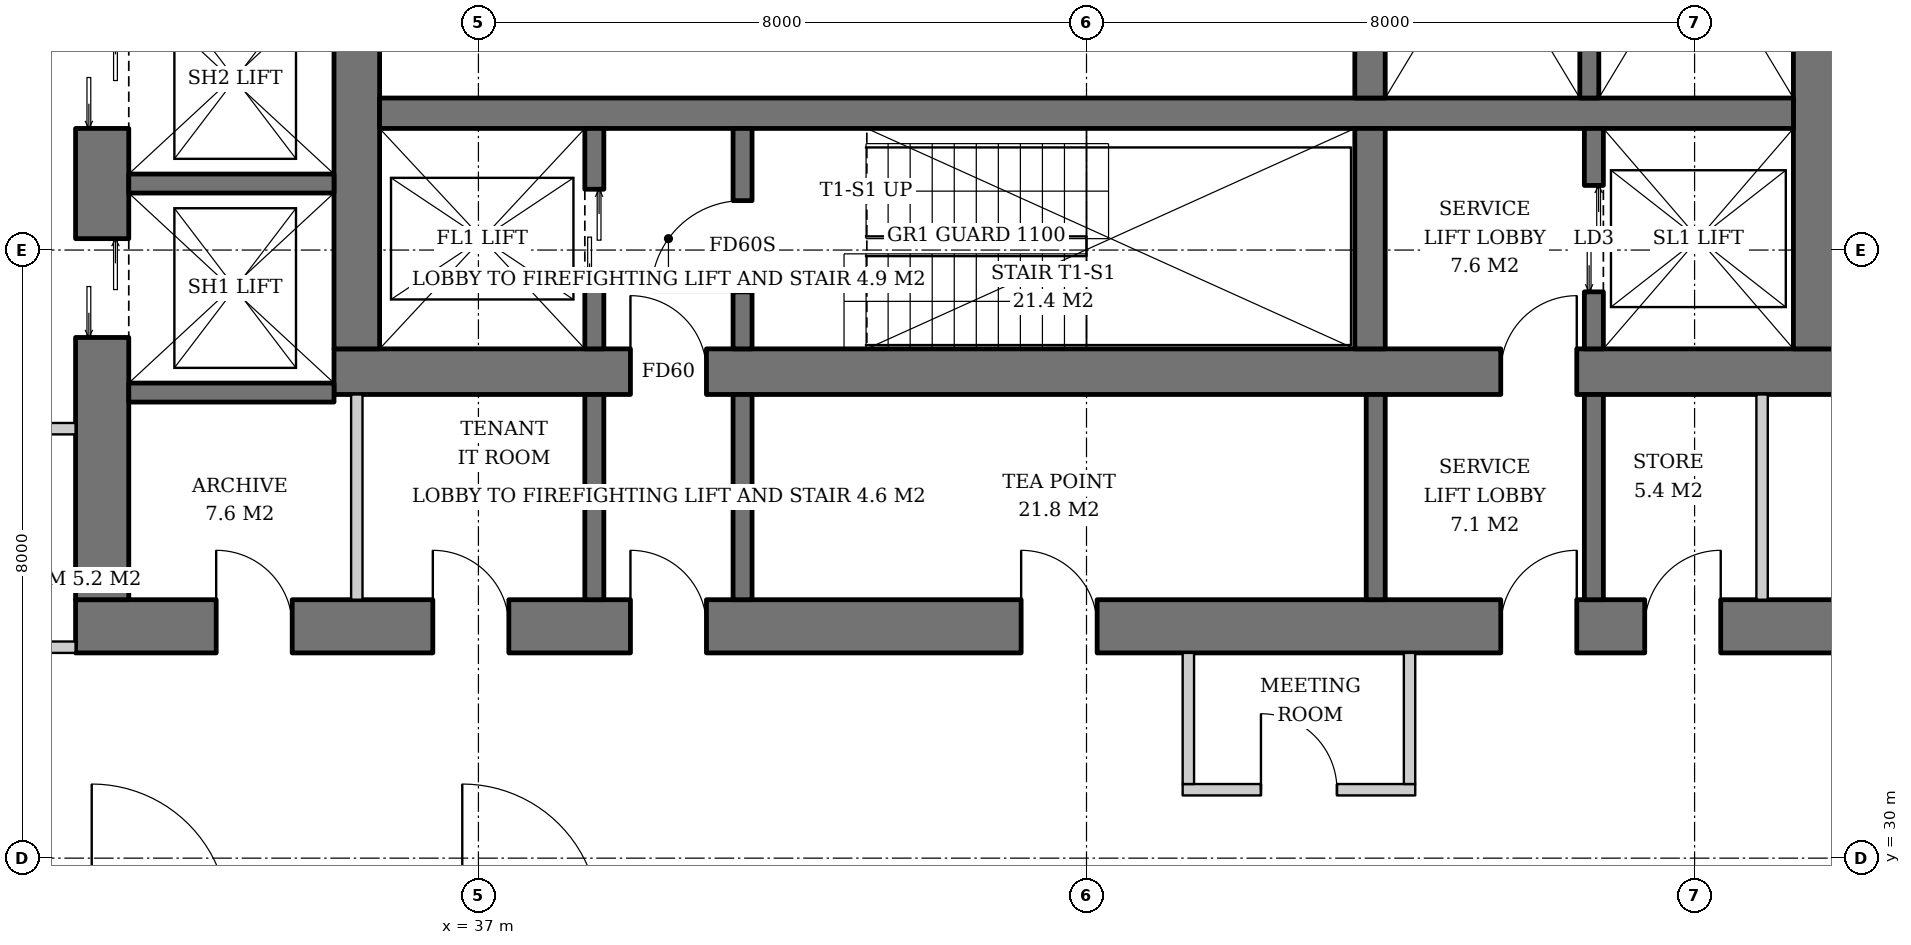
"""IFC4 building model, lengths in metres.
Left out: names, types, materials, properties, quantities, classifications, styles, units other than length and angle.
Written with IfcOpenShell. Run it as: python <this file> out.ifc"""

import sys

from ifc_helpers import new_model, si_unit, direction, frame, frame_2d, origin, place, context, subcontext, project, spatial, rectangle, extrude, element, fill, save


model = new_model("IFC4")
c1 = context("Model", 3, precision=1e-05, world=origin(), true_north=direction((0.0, 1.0)))
c2 = subcontext(c1, "Body", "Model", "MODEL_VIEW")
j1 = project(units=[si_unit("LENGTHUNIT", "METRE"), si_unit("PLANEANGLEUNIT", "RADIAN")], contexts=[c1])
p1 = place(None, origin())
s1 = spatial("IfcSite", under=j1, at=p1, CompositionType="ELEMENT")
p2 = place(p1, origin())
s2 = spatial("IfcBuilding", under=s1, at=p2, CompositionType="ELEMENT")
p3 = place(p2, frame((0.0, 0.0, 93.2)))
s3 = spatial("IfcBuildingStorey", under=s2, at=p3, CompositionType="ELEMENT", Elevation=93.2)
p4 = place(p3, frame((35.1, 36.4, 0.0), z_axis=(0.0, 0.0, 1.0), x_axis=(1.0, 0.0, 0.0)))
e1 = element("IfcWall", 1, at=p4, inside=s3, PredefinedType="SHEAR", context=c2, shape_type="SweptSolid", body=[
    extrude(rectangle(XDim=19.8, YDim=0.6, at=frame_2d((9.9, 0.0))), origin(), (0.0, 0.0, 1.0), 3.8),
])
p5 = place(p4, frame((3.9, 0.0, 0.0)))
e2 = element("IfcOpeningElement", 2, at=p5, cuts=e1, PredefinedType="OPENING", context=c2, shape_type="SweptSolid", body=[
    extrude(rectangle(XDim=1.0, YDim=2.1, at=frame_2d((0.5, 1.05))), frame((0.0, 0.31, 0.0), z_axis=(0.0, -1.0, 0.0), x_axis=(1.0, 0.0, 0.0)), (0.0, 0.0, 1.0), 0.62),
])
p6 = place(p4, frame((15.35, 0.0, 0.0)))
e3 = element("IfcOpeningElement", 3, at=p6, cuts=e1, PredefinedType="OPENING", context=c2, shape_type="SweptSolid", body=[
    extrude(rectangle(XDim=1.0, YDim=2.1, at=frame_2d((0.5, 1.05))), frame((0.0, 0.31, 0.0), z_axis=(0.0, -1.0, 0.0), x_axis=(1.0, 0.0, 0.0)), (0.0, 0.0, 1.0), 0.62),
])
p7 = place(p3, frame((35.4, 36.7, 0.0), z_axis=(0.0, 0.0, 1.0), x_axis=(0.0, 1.0, 0.0)))
e4 = element("IfcWall", 4, at=p7, inside=s3, PredefinedType="SHEAR", context=c2, shape_type="SweptSolid", body=[
    extrude(rectangle(XDim=18.6, YDim=0.6, at=frame_2d((9.3, 0.0))), origin(), (0.0, 0.0, 1.0), 3.8),
])
p8 = place(p7, frame((8.4, 0.0, 0.0)))
e5 = element("IfcOpeningElement", 5, at=p8, cuts=e4, PredefinedType="OPENING", context=c2, shape_type="SweptSolid", body=[
    extrude(rectangle(XDim=1.8, YDim=2.4, at=frame_2d((0.9, 1.2))), frame((0.0, 0.31, 0.0), z_axis=(0.0, -1.0, 0.0), x_axis=(1.0, 0.0, 0.0)), (0.0, 0.0, 1.0), 0.62),
])
p9 = place(p3, frame((54.6, 36.7, 0.0), z_axis=(0.0, 0.0, 1.0), x_axis=(0.0, 1.0, 0.0)))
e6 = element("IfcWall", 6, at=p9, inside=s3, PredefinedType="SHEAR", context=c2, shape_type="SweptSolid", body=[
    extrude(rectangle(XDim=18.6, YDim=0.6, at=frame_2d((9.3, 0.0))), origin(), (0.0, 0.0, 1.0), 3.8),
])
p10 = place(p9, frame((8.4, 0.0, 0.0)))
e7 = element("IfcOpeningElement", 7, at=p10, cuts=e6, PredefinedType="OPENING", context=c2, shape_type="SweptSolid", body=[
    extrude(rectangle(XDim=1.8, YDim=2.4, at=frame_2d((0.9, 1.2))), frame((0.0, 0.31, 0.0), z_axis=(0.0, -1.0, 0.0), x_axis=(1.0, 0.0, 0.0)), (0.0, 0.0, 1.0), 0.62),
])
p11 = place(p3, frame((31.7, 33.05, 0.0), z_axis=(0.0, 0.0, 1.0), x_axis=(1.0, 0.0, 0.0)))
e8 = element("IfcWall", 8, at=p11, inside=s3, PredefinedType="SHEAR", context=c2, shape_type="SweptSolid", body=[
    extrude(rectangle(XDim=26.6, YDim=0.7, at=frame_2d((13.3, 0.0))), origin(), (0.0, 0.0, 1.0), 3.8),
])
p12 = place(p11, frame((7.3, 0.0, 0.0)))
e9 = element("IfcOpeningElement", 9, at=p12, cuts=e8, PredefinedType="OPENING", context=c2, shape_type="SweptSolid", body=[
    extrude(rectangle(XDim=1.0, YDim=2.1, at=frame_2d((0.5, 1.05))), frame((0.0, 0.36, 0.0), z_axis=(0.0, -1.0, 0.0), x_axis=(1.0, 0.0, 0.0)), (0.0, 0.0, 1.0), 0.72),
])
p13 = place(p11, frame((18.75, 0.0, 0.0)))
e10 = element("IfcOpeningElement", 10, at=p13, cuts=e8, PredefinedType="OPENING", context=c2, shape_type="SweptSolid", body=[
    extrude(rectangle(XDim=1.0, YDim=2.1, at=frame_2d((0.5, 1.05))), frame((0.0, 0.36, 0.0), z_axis=(0.0, -1.0, 0.0), x_axis=(1.0, 0.0, 0.0)), (0.0, 0.0, 1.0), 0.72),
])
p14 = place(p11, frame((1.85, 0.0, 0.0)))
e11 = element("IfcOpeningElement", 11, at=p14, cuts=e8, PredefinedType="OPENING", context=c2, shape_type="SweptSolid", body=[
    extrude(rectangle(XDim=1.0, YDim=2.1, at=frame_2d((0.5, 1.05))), frame((0.0, 0.36, 0.0), z_axis=(0.0, -1.0, 0.0), x_axis=(1.0, 0.0, 0.0)), (0.0, 0.0, 1.0), 0.72),
])
p15 = place(p11, frame((4.7, 0.0, 0.0)))
e12 = element("IfcOpeningElement", 12, at=p15, cuts=e8, PredefinedType="OPENING", context=c2, shape_type="SweptSolid", body=[
    extrude(rectangle(XDim=1.0, YDim=2.1, at=frame_2d((0.5, 1.05))), frame((0.0, 0.36, 0.0), z_axis=(0.0, -1.0, 0.0), x_axis=(1.0, 0.0, 0.0)), (0.0, 0.0, 1.0), 0.72),
])
p16 = place(p11, frame((12.44, 0.0, 0.0)))
e13 = element("IfcOpeningElement", 13, at=p16, cuts=e8, PredefinedType="OPENING", context=c2, shape_type="SweptSolid", body=[
    extrude(rectangle(XDim=1.0, YDim=2.1, at=frame_2d((0.5, 1.05))), frame((0.0, 0.36, 0.0), z_axis=(0.0, -1.0, 0.0), x_axis=(1.0, 0.0, 0.0)), (0.0, 0.0, 1.0), 0.72),
])
p17 = place(p11, frame((20.644, 0.0, 0.0)))
e14 = element("IfcOpeningElement", 14, at=p17, cuts=e8, PredefinedType="OPENING", context=c2, shape_type="SweptSolid", body=[
    extrude(rectangle(XDim=1.0, YDim=2.1, at=frame_2d((0.5, 1.05))), frame((0.0, 0.36, 0.0), z_axis=(0.0, -1.0, 0.0), x_axis=(1.0, 0.0, 0.0)), (0.0, 0.0, 1.0), 0.72),
])
p18 = place(p11, frame((23.544, 0.0, 0.0)))
e15 = element("IfcOpeningElement", 15, at=p18, cuts=e8, PredefinedType="OPENING", context=c2, shape_type="SweptSolid", body=[
    extrude(rectangle(XDim=1.0, YDim=2.1, at=frame_2d((0.5, 1.05))), frame((0.0, 0.36, 0.0), z_axis=(0.0, -1.0, 0.0), x_axis=(1.0, 0.0, 0.0)), (0.0, 0.0, 1.0), 0.72),
])
p19 = place(p3, frame((32.05, 33.4, 0.0), z_axis=(0.0, 0.0, 1.0), x_axis=(0.0, 1.0, 0.0)))
e16 = element("IfcWall", 16, at=p19, inside=s3, PredefinedType="SHEAR", context=c2, shape_type="SweptSolid", body=[
    extrude(rectangle(XDim=25.2, YDim=0.7, at=frame_2d((12.6, 0.0))), origin(), (0.0, 0.0, 1.0), 3.8),
])
p20 = place(p19, frame((3.45, 0.0, 0.0)))
e17 = element("IfcOpeningElement", 17, at=p20, cuts=e16, PredefinedType="OPENING", context=c2, shape_type="SweptSolid", body=[
    extrude(rectangle(XDim=1.3, YDim=2.2, at=frame_2d((0.65, 1.1))), frame((0.0, 0.36, 0.0), z_axis=(0.0, -1.0, 0.0), x_axis=(1.0, 0.0, 0.0)), (0.0, 0.0, 1.0), 0.72),
])
p21 = place(p19, frame((6.2, 0.0, 0.0)))
e18 = element("IfcOpeningElement", 18, at=p21, cuts=e16, PredefinedType="OPENING", context=c2, shape_type="SweptSolid", body=[
    extrude(rectangle(XDim=1.3, YDim=2.2, at=frame_2d((0.65, 1.1))), frame((0.0, 0.36, 0.0), z_axis=(0.0, -1.0, 0.0), x_axis=(1.0, 0.0, 0.0)), (0.0, 0.0, 1.0), 0.72),
])
p22 = place(p19, frame((8.95, 0.0, 0.0)))
e19 = element("IfcOpeningElement", 19, at=p22, cuts=e16, PredefinedType="OPENING", context=c2, shape_type="SweptSolid", body=[
    extrude(rectangle(XDim=1.3, YDim=2.2, at=frame_2d((0.65, 1.1))), frame((0.0, 0.36, 0.0), z_axis=(0.0, -1.0, 0.0), x_axis=(1.0, 0.0, 0.0)), (0.0, 0.0, 1.0), 0.72),
])
p23 = place(p19, frame((14.95, 0.0, 0.0)))
e20 = element("IfcOpeningElement", 20, at=p23, cuts=e16, PredefinedType="OPENING", context=c2, shape_type="SweptSolid", body=[
    extrude(rectangle(XDim=1.3, YDim=2.2, at=frame_2d((0.65, 1.1))), frame((0.0, 0.36, 0.0), z_axis=(0.0, -1.0, 0.0), x_axis=(1.0, 0.0, 0.0)), (0.0, 0.0, 1.0), 0.72),
])
p24 = place(p19, frame((17.7, 0.0, 0.0)))
e21 = element("IfcOpeningElement", 21, at=p24, cuts=e16, PredefinedType="OPENING", context=c2, shape_type="SweptSolid", body=[
    extrude(rectangle(XDim=1.3, YDim=2.2, at=frame_2d((0.65, 1.1))), frame((0.0, 0.36, 0.0), z_axis=(0.0, -1.0, 0.0), x_axis=(1.0, 0.0, 0.0)), (0.0, 0.0, 1.0), 0.72),
])
p25 = place(p19, frame((11.7, 0.0, 0.0)))
e22 = element("IfcOpeningElement", 22, at=p25, cuts=e16, PredefinedType="OPENING", context=c2, shape_type="SweptSolid", body=[
    extrude(rectangle(XDim=1.8, YDim=2.4, at=frame_2d((0.9, 1.2))), frame((0.0, 0.36, 0.0), z_axis=(0.0, -1.0, 0.0), x_axis=(1.0, 0.0, 0.0)), (0.0, 0.0, 1.0), 0.72),
])
p26 = place(p3, frame((35.7, 39.8, 0.0), z_axis=(0.0, 0.0, 1.0), x_axis=(1.0, 0.0, 0.0)))
e23 = element("IfcWall", 23, at=p26, inside=s3, PredefinedType="SHEAR", context=c2, shape_type="SweptSolid", body=[
    extrude(rectangle(XDim=18.6, YDim=0.4, at=frame_2d((9.3, 0.0))), origin(), (0.0, 0.0, 1.0), 3.8),
])
p27 = place(p3, frame((48.73, 36.7, 0.0), z_axis=(0.0, 0.0, 1.0), x_axis=(0.0, 1.0, 0.0)))
e24 = element("IfcWall", 24, at=p27, inside=s3, PredefinedType="SHEAR", context=c2, shape_type="SweptSolid", body=[
    extrude(rectangle(XDim=2.9, YDim=0.4, at=frame_2d((1.45, 0.0))), origin(), (0.0, 0.0, 1.0), 3.8),
])
p28 = place(p3, frame((48.73, 40.0, 0.0), z_axis=(0.0, 0.0, 1.0), x_axis=(0.0, 1.0, 0.0)))
e25 = element("IfcWall", 25, at=p28, inside=s3, PredefinedType="SHEAR", context=c2, shape_type="SweptSolid", body=[
    extrude(rectangle(XDim=12.0, YDim=0.4, at=frame_2d((6.0, 0.0))), origin(), (0.0, 0.0, 1.0), 3.8),
])
p29 = place(p3, frame((38.525, 36.7, 0.0), z_axis=(0.0, 0.0, 1.0), x_axis=(0.0, 1.0, 0.0)))
e26 = element("IfcWall", 26, at=p29, inside=s3, PredefinedType="SHEAR", context=c2, shape_type="SweptSolid", body=[
    extrude(rectangle(XDim=2.9, YDim=0.25, at=frame_2d((1.45, 0.0))), origin(), (0.0, 0.0, 1.0), 3.8),
])
p30 = place(p29, frame((0.8, 0.0, 0.0)))
e27 = element("IfcOpeningElement", 27, at=p30, cuts=e26, PredefinedType="OPENING", context=c2, shape_type="SweptSolid", body=[
    extrude(rectangle(XDim=1.3, YDim=2.2, at=frame_2d((0.65, 1.1))), frame((0.0, 0.135, 0.0), z_axis=(0.0, -1.0, 0.0), x_axis=(1.0, 0.0, 0.0)), (0.0, 0.0, 1.0), 0.27),
])
p31 = place(p3, frame((40.475, 36.7, 0.0), z_axis=(0.0, 0.0, 1.0), x_axis=(0.0, 1.0, 0.0)))
e28 = element("IfcWall", 28, at=p31, inside=s3, PredefinedType="SHEAR", context=c2, shape_type="SweptSolid", body=[
    extrude(rectangle(XDim=2.9, YDim=0.25, at=frame_2d((1.45, 0.0))), origin(), (0.0, 0.0, 1.0), 3.8),
])
p32 = place(p31, frame((0.75, 0.0, 0.0)))
e29 = element("IfcOpeningElement", 29, at=p32, cuts=e28, PredefinedType="OPENING", context=c2, shape_type="SweptSolid", body=[
    extrude(rectangle(XDim=1.2, YDim=2.1, at=frame_2d((0.6, 1.05))), frame((0.0, 0.135, 0.0), z_axis=(0.0, -1.0, 0.0), x_axis=(1.0, 0.0, 0.0)), (0.0, 0.0, 1.0), 0.27),
])
p33 = place(p3, frame((51.675, 36.7, 0.0), z_axis=(0.0, 0.0, 1.0), x_axis=(0.0, 1.0, 0.0)))
e30 = element("IfcWall", 30, at=p33, inside=s3, PredefinedType="SHEAR", context=c2, shape_type="SweptSolid", body=[
    extrude(rectangle(XDim=2.9, YDim=0.25, at=frame_2d((1.45, 0.0))), origin(), (0.0, 0.0, 1.0), 3.8),
])
p34 = place(p33, frame((0.75, 0.0, 0.0)))
e31 = element("IfcOpeningElement", 31, at=p34, cuts=e30, PredefinedType="OPENING", context=c2, shape_type="SweptSolid", body=[
    extrude(rectangle(XDim=1.4, YDim=2.4, at=frame_2d((0.7, 1.2))), frame((0.0, 0.135, 0.0), z_axis=(0.0, -1.0, 0.0), x_axis=(1.0, 0.0, 0.0)), (0.0, 0.0, 1.0), 0.27),
])
p35 = place(p3, frame((51.615, 44.25, 0.0), z_axis=(0.0, 0.0, 1.0), x_axis=(0.0, -1.0, 0.0)))
e32 = element("IfcWall", 32, at=p35, inside=s3, PredefinedType="SHEAR", context=c2, shape_type="SweptSolid", body=[
    extrude(rectangle(XDim=4.25, YDim=0.25, at=frame_2d((2.125, 0.0))), origin(), (0.0, 0.0, 1.0), 3.8),
])
for number, where, z_axis, x_axis in (
    (33, (32.4, 36.125, 0.0), (0.0, 0.0, 1.0), (1.0, 0.0, 0.0)),
    (34, (32.4, 38.875, 0.0), (0.0, 0.0, 1.0), (1.0, 0.0, 0.0)),
):
    element("IfcWall", number, at=place(p3, frame(where, z_axis=z_axis, x_axis=x_axis)), inside=s3, PredefinedType="SHEAR", context=c2, shape_type="SweptSolid", body=[
        extrude(rectangle(XDim=2.7, YDim=0.25, at=frame_2d((1.35, 0.0))), origin(), (0.0, 0.0, 1.0), 3.8),
    ])
for number, where, z_axis, x_axis in (
    (35, (38.525, 33.4, 0.0), (0.0, 0.0, 1.0), (0.0, 1.0, 0.0)),
    (36, (40.475, 33.4, 0.0), (0.0, 0.0, 1.0), (0.0, 1.0, 0.0)),
    (37, (48.805, 33.4, 0.0), (0.0, 0.0, 1.0), (0.0, 1.0, 0.0)),
    (38, (51.675, 33.4, 0.0), (0.0, 0.0, 1.0), (0.0, 1.0, 0.0)),
):
    element("IfcWall", number, at=place(p3, frame(where, z_axis=z_axis, x_axis=x_axis)), inside=s3, PredefinedType="SOLIDWALL", context=c2, shape_type="SweptSolid", body=[
        extrude(rectangle(XDim=2.7, YDim=0.25, at=frame_2d((1.35, 0.0))), origin(), (0.0, 0.0, 1.0), 3.62),
    ])
for number, where, z_axis, x_axis in (
    (39, (35.4, 33.4, 0.0), (0.0, 0.0, 1.0), (0.0, 1.0, 0.0)),
    (40, (53.888, 33.4, 0.0), (0.0, 0.0, 1.0), (0.0, 1.0, 0.0)),
):
    element("IfcWall", number, at=place(p3, frame(where, z_axis=z_axis, x_axis=x_axis)), inside=s3, PredefinedType="SOLIDWALL", context=c2, shape_type="SweptSolid", body=[
        extrude(rectangle(XDim=2.7, YDim=0.15, at=frame_2d((1.35, 0.0))), origin(), (0.0, 0.0, 1.0), 3.62),
    ])
for number, where, z_axis, x_axis in (
    (41, (31.7, 35.65, 0.0), (0.0, 0.0, 1.0), (-1.0, 0.0, 0.0)),
    (42, (31.7, 32.775, 0.0), (0.0, 0.0, 1.0), (-1.0, 0.0, 0.0)),
):
    element("IfcWall", number, at=place(p3, frame(where, z_axis=z_axis, x_axis=x_axis)), inside=s3, PredefinedType="PARTITIONING", context=c2, shape_type="SweptSolid", body=[
        extrude(rectangle(XDim=1.725, YDim=0.15, at=frame_2d((0.862, 0.0))), origin(), (0.0, 0.0, 1.0), 3.62),
    ])
p36 = place(p3, frame((46.265, 30.9, 0.0), z_axis=(0.0, 0.0, 1.0), x_axis=(1.0, 0.0, 0.0)))
e43 = element("IfcWall", 43, at=p36, inside=s3, PredefinedType="PARTITIONING", context=c2, shape_type="SweptSolid", body=[
    extrude(rectangle(XDim=3.06, YDim=0.15, at=frame_2d((1.53, 0.0))), origin(), (0.0, 0.0, 1.0), 2.858),
])
p37 = place(p36, frame((1.03, 0.0, 0.0)))
e44 = element("IfcOpeningElement", 44, at=p37, cuts=e43, PredefinedType="OPENING", context=c2, shape_type="SweptSolid", body=[
    extrude(rectangle(XDim=1.0, YDim=2.1, at=frame_2d((0.5, 1.05))), frame((0.0, 0.085, 0.0), z_axis=(0.0, -1.0, 0.0), x_axis=(1.0, 0.0, 0.0)), (0.0, 0.0, 1.0), 0.17),
])
p38 = place(p3, frame((46.34, 32.7, 0.0), z_axis=(0.0, 0.0, 1.0), x_axis=(0.0, -1.0, 0.0)))
e45 = element("IfcWall", 45, at=p38, inside=s3, PredefinedType="PARTITIONING", context=c2, shape_type="SweptSolid", body=[
    extrude(rectangle(XDim=1.725, YDim=0.15, at=frame_2d((0.862, 0.0))), origin(), (0.0, 0.0, 1.0), 3.62),
])
p39 = place(p3, frame((49.25, 32.7, 0.0), z_axis=(0.0, 0.0, 1.0), x_axis=(0.0, -1.0, 0.0)))
e46 = element("IfcWall", 46, at=p39, inside=s3, PredefinedType="PARTITIONING", context=c2, shape_type="SweptSolid", body=[
    extrude(rectangle(XDim=1.725, YDim=0.15, at=frame_2d((0.862, 0.0))), origin(), (0.0, 0.0, 1.0), 2.858),
])
p40 = place(p30, origin())
e47 = element("IfcDoor", 47, at=p40, inside=s3, OperationType="DOUBLE_DOOR_SLIDING", PredefinedType="DOOR", context=c2, shape_type="SweptSolid", body=[
    extrude(rectangle(XDim=1.3, YDim=2.2, at=frame_2d((0.65, 1.1))), frame((0.0, 0.025, 0.0), z_axis=(0.0, -1.0, 0.0), x_axis=(1.0, 0.0, 0.0)), (0.0, 0.0, 1.0), 0.05),
])
fill(e27, e47)
p41 = place(p32, origin())
e48 = element("IfcDoor", 48, at=p41, inside=s3, OperationType="SINGLE_SWING_LEFT", PredefinedType="DOOR", context=c2, shape_type="SweptSolid", body=[
    extrude(rectangle(XDim=1.2, YDim=2.1, at=frame_2d((0.6, 1.05))), frame((0.0, 0.025, 0.0), z_axis=(0.0, -1.0, 0.0), x_axis=(1.0, 0.0, 0.0)), (0.0, 0.0, 1.0), 0.05),
])
fill(e29, e48)
p42 = place(p34, origin())
e49 = element("IfcDoor", 49, at=p42, inside=s3, OperationType="DOUBLE_DOOR_SLIDING", PredefinedType="DOOR", context=c2, shape_type="SweptSolid", body=[
    extrude(rectangle(XDim=1.4, YDim=2.4, at=frame_2d((0.7, 1.2))), frame((0.0, 0.025, 0.0), z_axis=(0.0, -1.0, 0.0), x_axis=(1.0, 0.0, 0.0)), (0.0, 0.0, 1.0), 0.05),
])
fill(e31, e49)
p43 = place(p5, origin())
e50 = element("IfcDoor", 50, at=p43, inside=s3, OperationType="SINGLE_SWING_LEFT", PredefinedType="DOOR", context=c2, shape_type="SweptSolid", body=[
    extrude(rectangle(XDim=1.0, YDim=2.1, at=frame_2d((0.5, 1.05))), frame((0.0, 0.025, 0.0), z_axis=(0.0, -1.0, 0.0), x_axis=(1.0, 0.0, 0.0)), (0.0, 0.0, 1.0), 0.05),
])
fill(e2, e50)
p44 = place(p6, origin())
e51 = element("IfcDoor", 51, at=p44, inside=s3, OperationType="SINGLE_SWING_RIGHT", PredefinedType="DOOR", context=c2, shape_type="SweptSolid", body=[
    extrude(rectangle(XDim=1.0, YDim=2.1, at=frame_2d((0.5, 1.05))), frame((0.0, 0.025, 0.0), z_axis=(0.0, -1.0, 0.0), x_axis=(1.0, 0.0, 0.0)), (0.0, 0.0, 1.0), 0.05),
])
fill(e3, e51)
p45 = place(p20, origin())
e52 = element("IfcDoor", 52, at=p45, inside=s3, OperationType="DOUBLE_DOOR_SLIDING", PredefinedType="DOOR", context=c2, shape_type="SweptSolid", body=[
    extrude(rectangle(XDim=1.3, YDim=2.2, at=frame_2d((0.65, 1.1))), frame((0.0, 0.025, 0.0), z_axis=(0.0, -1.0, 0.0), x_axis=(1.0, 0.0, 0.0)), (0.0, 0.0, 1.0), 0.05),
])
fill(e17, e52)
p46 = place(p21, origin())
e53 = element("IfcDoor", 53, at=p46, inside=s3, OperationType="DOUBLE_DOOR_SLIDING", PredefinedType="DOOR", context=c2, shape_type="SweptSolid", body=[
    extrude(rectangle(XDim=1.3, YDim=2.2, at=frame_2d((0.65, 1.1))), frame((0.0, 0.025, 0.0), z_axis=(0.0, -1.0, 0.0), x_axis=(1.0, 0.0, 0.0)), (0.0, 0.0, 1.0), 0.05),
])
fill(e18, e53)
p47 = place(p12, origin())
e54 = element("IfcDoor", 54, at=p47, inside=s3, OperationType="SINGLE_SWING_LEFT", PredefinedType="DOOR", context=c2, shape_type="SweptSolid", body=[
    extrude(rectangle(XDim=1.0, YDim=2.1, at=frame_2d((0.5, 1.05))), frame((0.0, 0.025, 0.0), z_axis=(0.0, -1.0, 0.0), x_axis=(1.0, 0.0, 0.0)), (0.0, 0.0, 1.0), 0.05),
])
fill(e9, e54)
p48 = place(p13, origin())
e55 = element("IfcDoor", 55, at=p48, inside=s3, OperationType="SINGLE_SWING_RIGHT", PredefinedType="DOOR", context=c2, shape_type="SweptSolid", body=[
    extrude(rectangle(XDim=1.0, YDim=2.1, at=frame_2d((0.5, 1.05))), frame((0.0, 0.025, 0.0), z_axis=(0.0, -1.0, 0.0), x_axis=(1.0, 0.0, 0.0)), (0.0, 0.0, 1.0), 0.05),
])
fill(e10, e55)
p49 = place(p14, origin())
e56 = element("IfcDoor", 56, at=p49, inside=s3, OperationType="SINGLE_SWING_LEFT", PredefinedType="DOOR", context=c2, shape_type="SweptSolid", body=[
    extrude(rectangle(XDim=1.0, YDim=2.1, at=frame_2d((0.5, 1.05))), frame((0.0, 0.34, 0.0), z_axis=(0.0, -1.0, 0.0), x_axis=(1.0, 0.0, 0.0)), (0.0, 0.0, 1.0), 0.05),
])
fill(e11, e56)
p50 = place(p15, origin())
e57 = element("IfcDoor", 57, at=p50, inside=s3, OperationType="SINGLE_SWING_LEFT", PredefinedType="DOOR", context=c2, shape_type="SweptSolid", body=[
    extrude(rectangle(XDim=1.0, YDim=2.1, at=frame_2d((0.5, 1.05))), frame((0.0, 0.34, 0.0), z_axis=(0.0, -1.0, 0.0), x_axis=(1.0, 0.0, 0.0)), (0.0, 0.0, 1.0), 0.05),
])
fill(e12, e57)
p51 = place(p16, origin())
e58 = element("IfcDoor", 58, at=p51, inside=s3, OperationType="SINGLE_SWING_LEFT", PredefinedType="DOOR", context=c2, shape_type="SweptSolid", body=[
    extrude(rectangle(XDim=1.0, YDim=2.1, at=frame_2d((0.5, 1.05))), frame((0.0, 0.34, 0.0), z_axis=(0.0, -1.0, 0.0), x_axis=(1.0, 0.0, 0.0)), (0.0, 0.0, 1.0), 0.05),
])
fill(e13, e58)
p52 = place(p17, origin())
e59 = element("IfcDoor", 59, at=p52, inside=s3, OperationType="SINGLE_SWING_RIGHT", PredefinedType="DOOR", context=c2, shape_type="SweptSolid", body=[
    extrude(rectangle(XDim=1.0, YDim=2.1, at=frame_2d((0.5, 1.05))), frame((0.0, 0.34, 0.0), z_axis=(0.0, -1.0, 0.0), x_axis=(1.0, 0.0, 0.0)), (0.0, 0.0, 1.0), 0.05),
])
fill(e14, e59)
p53 = place(p37, origin())
e60 = element("IfcDoor", 60, at=p53, inside=s3, OperationType="SINGLE_SWING_LEFT", PredefinedType="DOOR", context=c2, shape_type="SweptSolid", body=[
    extrude(rectangle(XDim=1.0, YDim=2.1, at=frame_2d((0.5, 1.05))), frame((0.0, 0.025, 0.0), z_axis=(0.0, -1.0, 0.0), x_axis=(1.0, 0.0, 0.0)), (0.0, 0.0, 1.0), 0.05),
])
fill(e44, e60)
save(model, sys.argv[1])
